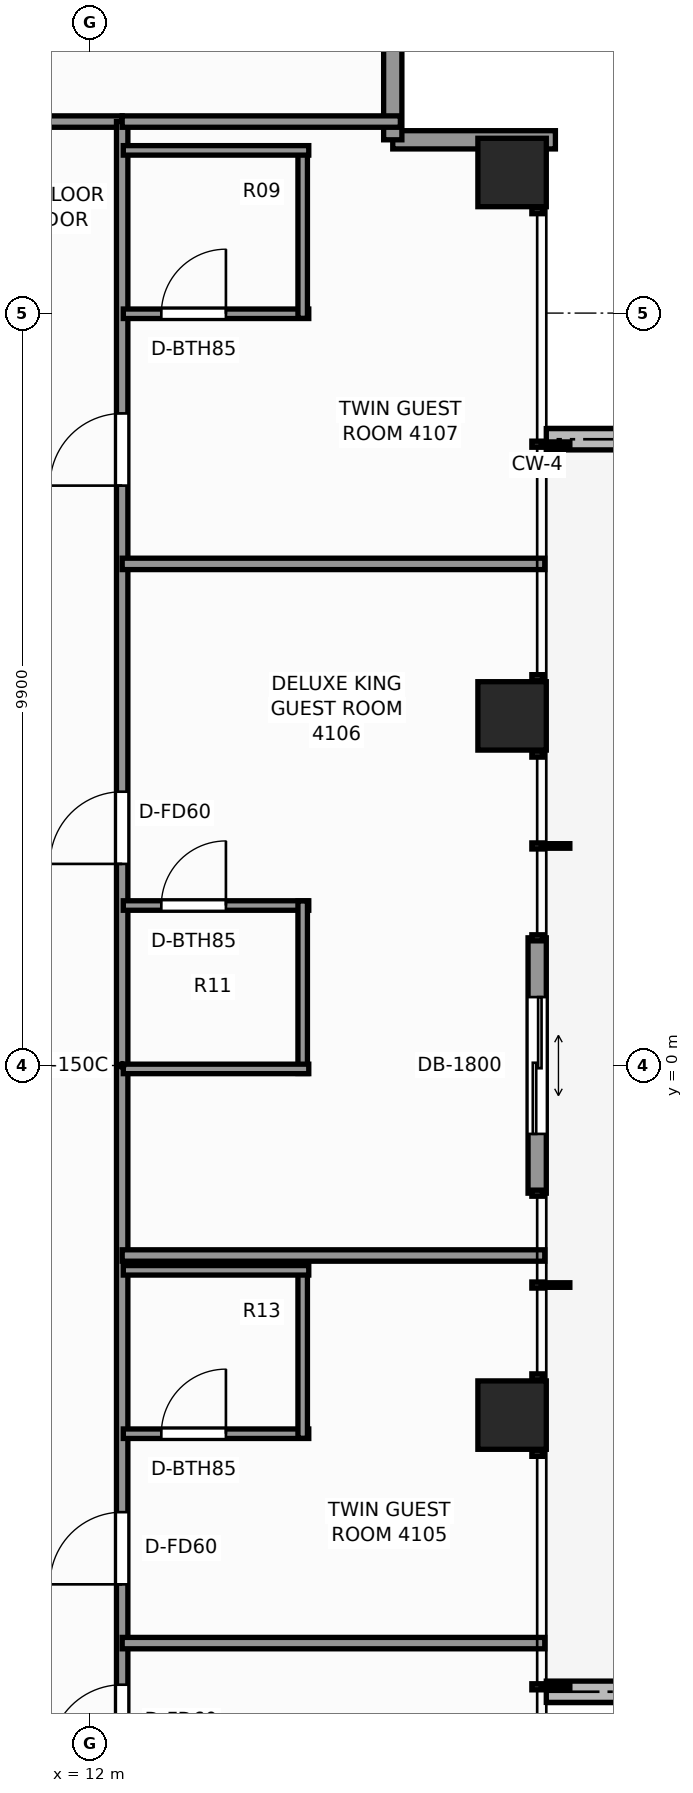
"""IFC4 building model, lengths in metres.
Left out: names, types, materials, properties, quantities, classifications, styles, units other than length and angle.
Written with IfcOpenShell. Run it as: python <this file> out.ifc"""

import sys

from ifc_helpers import new_model, si_unit, direction, frame, frame_2d, origin, origin_2d, place, context, subcontext, project, spatial, rectangle, extrude, element, fill, save


model = new_model("IFC4")
c1 = context("Model", 3, precision=1e-05, world=origin(), true_north=direction((0.0, 1.0)))
c2 = subcontext(c1, "Body", "Model", "MODEL_VIEW")
j1 = project(units=[si_unit("LENGTHUNIT", "METRE"), si_unit("PLANEANGLEUNIT", "RADIAN")], contexts=[c1])
p1 = place(None, origin())
s1 = spatial("IfcSite", under=j1, at=p1, CompositionType="ELEMENT")
p2 = place(p1, origin())
s2 = spatial("IfcBuilding", under=s1, at=p2, CompositionType="ELEMENT")
p3 = place(p2, frame((0.0, 0.0, 141.5)))
s3 = spatial("IfcBuildingStorey", under=s2, at=p3, CompositionType="ELEMENT", Elevation=141.5)
for number, where, z_axis, x_axis in (
    (1, (17.55, -4.6, 0.0), (0.0, 0.0, 1.0), (1.0, 0.0, 0.0)),
    (2, (17.55, 4.6, 0.0), (0.0, 0.0, 1.0), (1.0, 0.0, 0.0)),
    (3, (17.55, 11.75, 0.0), (0.0, 0.0, 1.0), (1.0, 0.0, 0.0)),
):
    element("IfcColumn", number, at=place(p3, frame(where, z_axis=z_axis, x_axis=x_axis)), inside=s3, PredefinedType="COLUMN", context=c2, shape_type="SweptSolid", body=[
        extrude(rectangle(XDim=0.9, YDim=0.9, at=origin_2d()), origin(), (0.0, 0.0, 1.0), 3.3),
    ])
p4 = place(p3, frame((20.34, 8.24, -0.02), z_axis=(0.0, 0.0, 1.0), x_axis=(-1.0, 0.0, 0.0)))
e4 = element("IfcWall", 4, at=p4, inside=s3, PredefinedType="PARAPET", context=c2, shape_type="SweptSolid", body=[
    extrude(rectangle(XDim=2.34, YDim=0.28, at=frame_2d((1.17, 0.0))), origin(), (0.0, 0.0, 1.0), 0.42),
])
p5 = place(p3, frame((18.0, -8.24, -0.02), z_axis=(0.0, 0.0, 1.0), x_axis=(1.0, 0.0, 0.0)))
e5 = element("IfcWall", 5, at=p5, inside=s3, PredefinedType="PARAPET", context=c2, shape_type="SweptSolid", body=[
    extrude(rectangle(XDim=1.313, YDim=0.28, at=frame_2d((0.656, 0.0))), origin(), (0.0, 0.0, 1.0), 0.42),
])
p6 = place(p3, frame((17.88, 1.68, 0.0), z_axis=(0.0, 0.0, 1.0), x_axis=(0.0, -1.0, 0.0)))
e6 = element("IfcWall", 6, at=p6, inside=s3, PredefinedType="STANDARD", context=c2, shape_type="SweptSolid", body=[
    extrude(rectangle(XDim=3.36, YDim=0.24, at=frame_2d((1.68, 0.0))), origin(), (0.0, 0.0, 1.0), 3.1),
])
p7 = place(p6, frame((0.78, 0.0, 0.0)))
e7 = element("IfcOpeningElement", 7, at=p7, cuts=e6, PredefinedType="OPENING", context=c2, shape_type="SweptSolid", body=[
    extrude(rectangle(XDim=1.8, YDim=2.2, at=frame_2d((0.9, 1.1))), frame((0.0, 0.13, 0.0), z_axis=(0.0, -1.0, 0.0), x_axis=(1.0, 0.0, 0.0)), (0.0, 0.0, 1.0), 0.26),
])
for number, where, z_axis, x_axis in (
    (8, (15.98, 12.18, 0.0), (0.0, 0.0, 1.0), (1.0, 0.0, 0.0)),
    (9, (15.98, 14.32, 0.0), (0.0, 0.0, 1.0), (0.0, -1.0, 0.0)),
):
    element("IfcWall", number, at=place(p3, frame(where, z_axis=z_axis, x_axis=x_axis)), inside=s3, PredefinedType="STANDARD", context=c2, shape_type="SweptSolid", body=[
        extrude(rectangle(XDim=2.14, YDim=0.24, at=frame_2d((1.07, 0.0))), origin(), (0.0, 0.0, 1.0), 2.479),
    ])
p8 = place(p3, frame((-12.26, 12.42, 0.0), z_axis=(0.0, 0.0, 1.0), x_axis=(1.0, 0.0, 0.0)))
e10 = element("IfcWall", 10, at=p8, inside=s3, PredefinedType="PARTITIONING", context=c2, shape_type="SweptSolid", body=[
    extrude(rectangle(XDim=24.68, YDim=0.15, at=frame_2d((12.34, 0.0))), origin(), (0.0, 0.0, 1.0), 2.312),
])
p9 = place(p8, frame((2.93, 0.0, 0.0)))
e11 = element("IfcOpeningElement", 11, at=p9, cuts=e10, PredefinedType="OPENING", context=c2, shape_type="SweptSolid", body=[
    extrude(rectangle(XDim=0.9, YDim=2.06, at=frame_2d((0.45, 1.03))), frame((0.0, 0.085, 0.0), z_axis=(0.0, -1.0, 0.0), x_axis=(1.0, 0.0, 0.0)), (0.0, 0.0, 1.0), 0.17),
])
p10 = place(p8, frame((5.09, 0.0, 0.0)))
e12 = element("IfcOpeningElement", 12, at=p10, cuts=e10, PredefinedType="OPENING", context=c2, shape_type="SweptSolid", body=[
    extrude(rectangle(XDim=0.9, YDim=2.06, at=frame_2d((0.45, 1.03))), frame((0.0, 0.085, 0.0), z_axis=(0.0, -1.0, 0.0), x_axis=(1.0, 0.0, 0.0)), (0.0, 0.0, 1.0), 0.17),
])
p11 = place(p8, frame((9.092, 0.0, 0.0)))
e13 = element("IfcOpeningElement", 13, at=p11, cuts=e10, PredefinedType="OPENING", context=c2, shape_type="SweptSolid", body=[
    extrude(rectangle(XDim=0.95, YDim=2.06, at=frame_2d((0.475, 1.03))), frame((0.0, 0.085, 0.0), z_axis=(0.0, -1.0, 0.0), x_axis=(1.0, 0.0, 0.0)), (0.0, 0.0, 1.0), 0.17),
])
p12 = place(p8, frame((13.84, 0.0, 0.0)))
e14 = element("IfcOpeningElement", 14, at=p12, cuts=e10, PredefinedType="OPENING", context=c2, shape_type="SweptSolid", body=[
    extrude(rectangle(XDim=0.9, YDim=2.06, at=frame_2d((0.45, 1.03))), frame((0.0, 0.085, 0.0), z_axis=(0.0, -1.0, 0.0), x_axis=(1.0, 0.0, 0.0)), (0.0, 0.0, 1.0), 0.17),
])
p13 = place(p8, frame((20.256, 0.0, 0.0)))
e15 = element("IfcOpeningElement", 15, at=p13, cuts=e10, PredefinedType="OPENING", context=c2, shape_type="SweptSolid", body=[
    extrude(rectangle(XDim=0.9, YDim=2.06, at=frame_2d((0.45, 1.03))), frame((0.0, 0.085, 0.0), z_axis=(0.0, -1.0, 0.0), x_axis=(1.0, 0.0, 0.0)), (0.0, 0.0, 1.0), 0.17),
])
p14 = place(p3, frame((12.42, -12.42, 0.0), z_axis=(0.0, 0.0, 1.0), x_axis=(0.0, 1.0, 0.0)))
e16 = element("IfcWall", 16, at=p14, inside=s3, PredefinedType="PARTITIONING", context=c2, shape_type="SweptSolid", body=[
    extrude(rectangle(XDim=24.84, YDim=0.15, at=frame_2d((12.42, 0.0))), origin(), (0.0, 0.0, 1.0), 2.312),
])
p15 = place(p14, frame((3.323, 0.0, 0.0)))
e17 = element("IfcOpeningElement", 17, at=p15, cuts=e16, PredefinedType="OPENING", context=c2, shape_type="SweptSolid", body=[
    extrude(rectangle(XDim=0.95, YDim=2.06, at=frame_2d((0.475, 1.03))), frame((0.0, 0.085, 0.0), z_axis=(0.0, -1.0, 0.0), x_axis=(1.0, 0.0, 0.0)), (0.0, 0.0, 1.0), 0.17),
])
p16 = place(p14, frame((5.593, 0.0, 0.0)))
e18 = element("IfcOpeningElement", 18, at=p16, cuts=e16, PredefinedType="OPENING", context=c2, shape_type="SweptSolid", body=[
    extrude(rectangle(XDim=0.95, YDim=2.06, at=frame_2d((0.475, 1.03))), frame((0.0, 0.085, 0.0), z_axis=(0.0, -1.0, 0.0), x_axis=(1.0, 0.0, 0.0)), (0.0, 0.0, 1.0), 0.17),
])
p17 = place(p14, frame((15.073, 0.0, 0.0)))
e19 = element("IfcOpeningElement", 19, at=p17, cuts=e16, PredefinedType="OPENING", context=c2, shape_type="SweptSolid", body=[
    extrude(rectangle(XDim=0.95, YDim=2.06, at=frame_2d((0.475, 1.03))), frame((0.0, 0.085, 0.0), z_axis=(0.0, -1.0, 0.0), x_axis=(1.0, 0.0, 0.0)), (0.0, 0.0, 1.0), 0.17),
])
p18 = place(p14, frame((20.05, 0.0, 0.0)))
e20 = element("IfcOpeningElement", 20, at=p18, cuts=e16, PredefinedType="OPENING", context=c2, shape_type="SweptSolid", body=[
    extrude(rectangle(XDim=0.95, YDim=2.06, at=frame_2d((0.475, 1.03))), frame((0.0, 0.085, 0.0), z_axis=(0.0, -1.0, 0.0), x_axis=(1.0, 0.0, 0.0)), (0.0, 0.0, 1.0), 0.17),
])
p19 = place(p3, frame((12.42, 12.42, 0.0), z_axis=(0.0, 0.0, 1.0), x_axis=(1.0, 0.0, 0.0)))
e21 = element("IfcWall", 21, at=p19, inside=s3, PredefinedType="PARTITIONING", context=c2, shape_type="SweptSolid", body=[
    extrude(rectangle(XDim=3.66, YDim=0.15, at=frame_2d((1.83, 0.0))), origin(), (0.0, 0.0, 1.0), 3.1),
])
for number, where, z_axis, x_axis in (
    (22, (12.42, -7.6, 0.0), (0.0, 0.0, 1.0), (1.0, 0.0, 0.0)),
    (23, (12.42, -2.5, 0.0), (0.0, 0.0, 1.0), (1.0, 0.0, 0.0)),
):
    element("IfcWall", number, at=place(p3, frame(where, z_axis=z_axis, x_axis=x_axis)), inside=s3, PredefinedType="PARTITIONING", context=c2, shape_type="SweptSolid", body=[
        extrude(rectangle(XDim=5.56, YDim=0.15, at=frame_2d((2.78, 0.0))), origin(), (0.0, 0.0, 1.0), 2.469),
    ])
p20 = place(p3, frame((12.435, -4.845, 0.0), z_axis=(0.0, 0.0, 1.0), x_axis=(1.0, 0.0, 0.0)))
e24 = element("IfcWall", 24, at=p20, inside=s3, PredefinedType="PARTITIONING", context=c2, shape_type="SweptSolid", body=[
    extrude(rectangle(XDim=2.44, YDim=0.125, at=frame_2d((1.22, 0.0))), origin(), (0.0, 0.0, 1.0), 2.312),
])
p21 = place(p20, frame((0.5, 0.0, 0.0)))
e25 = element("IfcOpeningElement", 25, at=p21, cuts=e24, PredefinedType="OPENING", context=c2, shape_type="SweptSolid", body=[
    extrude(rectangle(XDim=0.85, YDim=2.03, at=frame_2d((0.425, 1.015))), frame((0.0, 0.073, 0.0), z_axis=(0.0, -1.0, 0.0), x_axis=(1.0, 0.0, 0.0)), (0.0, 0.0, 1.0), 0.145),
])
p22 = place(p3, frame((14.795, -4.905, 0.0), z_axis=(0.0, 0.0, 1.0), x_axis=(0.0, 1.0, 0.0)))
e26 = element("IfcWall", 26, at=p22, inside=s3, PredefinedType="PARTITIONING", context=c2, shape_type="SweptSolid", body=[
    extrude(rectangle(XDim=2.27, YDim=0.125, at=frame_2d((1.135, 0.0))), origin(), (0.0, 0.0, 1.0), 2.312),
])
p23 = place(p3, frame((12.435, -2.695, 0.0), z_axis=(0.0, 0.0, 1.0), x_axis=(1.0, 0.0, 0.0)))
e27 = element("IfcWall", 27, at=p23, inside=s3, PredefinedType="PARTITIONING", context=c2, shape_type="SweptSolid", body=[
    extrude(rectangle(XDim=2.44, YDim=0.125, at=frame_2d((1.22, 0.0))), origin(), (0.0, 0.0, 1.0), 3.1),
])
p24 = place(p3, frame((12.42, 6.6, 0.0), z_axis=(0.0, 0.0, 1.0), x_axis=(1.0, 0.0, 0.0)))
e28 = element("IfcWall", 28, at=p24, inside=s3, PredefinedType="PARTITIONING", context=c2, shape_type="SweptSolid", body=[
    extrude(rectangle(XDim=5.56, YDim=0.15, at=frame_2d((2.78, 0.0))), origin(), (0.0, 0.0, 1.0), 2.469),
])
p25 = place(p3, frame((12.435, 2.105, 0.0), z_axis=(0.0, 0.0, 1.0), x_axis=(1.0, 0.0, 0.0)))
e29 = element("IfcWall", 29, at=p25, inside=s3, PredefinedType="PARTITIONING", context=c2, shape_type="SweptSolid", body=[
    extrude(rectangle(XDim=2.44, YDim=0.125, at=frame_2d((1.22, 0.0))), origin(), (0.0, 0.0, 1.0), 3.1),
])
p26 = place(p25, frame((0.5, 0.0, 0.0)))
e30 = element("IfcOpeningElement", 30, at=p26, cuts=e29, PredefinedType="OPENING", context=c2, shape_type="SweptSolid", body=[
    extrude(rectangle(XDim=0.85, YDim=2.03, at=frame_2d((0.425, 1.015))), frame((0.0, 0.073, 0.0), z_axis=(0.0, -1.0, 0.0), x_axis=(1.0, 0.0, 0.0)), (0.0, 0.0, 1.0), 0.145),
])
p27 = place(p3, frame((14.795, -0.105, 0.0), z_axis=(0.0, 0.0, 1.0), x_axis=(0.0, 1.0, 0.0)))
e31 = element("IfcWall", 31, at=p27, inside=s3, PredefinedType="PARTITIONING", context=c2, shape_type="SweptSolid", body=[
    extrude(rectangle(XDim=2.27, YDim=0.125, at=frame_2d((1.135, 0.0))), origin(), (0.0, 0.0, 1.0), 2.625),
])
p28 = place(p3, frame((12.435, -0.045, 0.0), z_axis=(0.0, 0.0, 1.0), x_axis=(1.0, 0.0, 0.0)))
e32 = element("IfcWall", 32, at=p28, inside=s3, PredefinedType="PARTITIONING", context=c2, shape_type="SweptSolid", body=[
    extrude(rectangle(XDim=2.44, YDim=0.125, at=frame_2d((1.22, 0.0))), origin(), (0.0, 0.0, 1.0), 2.625),
])
p29 = place(p3, frame((12.435, 9.891, 0.0), z_axis=(0.0, 0.0, 1.0), x_axis=(1.0, 0.0, 0.0)))
e33 = element("IfcWall", 33, at=p29, inside=s3, PredefinedType="PARTITIONING", context=c2, shape_type="SweptSolid", body=[
    extrude(rectangle(XDim=2.44, YDim=0.125, at=frame_2d((1.22, 0.0))), origin(), (0.0, 0.0, 1.0), 3.1),
])
p30 = place(p29, frame((0.5, 0.0, 0.0)))
e34 = element("IfcOpeningElement", 34, at=p30, cuts=e33, PredefinedType="OPENING", context=c2, shape_type="SweptSolid", body=[
    extrude(rectangle(XDim=0.85, YDim=2.03, at=frame_2d((0.425, 1.015))), frame((0.0, 0.073, 0.0), z_axis=(0.0, -1.0, 0.0), x_axis=(1.0, 0.0, 0.0)), (0.0, 0.0, 1.0), 0.145),
])
p31 = place(p3, frame((14.795, 9.831, 0.0), z_axis=(0.0, 0.0, 1.0), x_axis=(0.0, 1.0, 0.0)))
e35 = element("IfcWall", 35, at=p31, inside=s3, PredefinedType="PARTITIONING", context=c2, shape_type="SweptSolid", body=[
    extrude(rectangle(XDim=2.27, YDim=0.125, at=frame_2d((1.135, 0.0))), origin(), (0.0, 0.0, 1.0), 2.312),
])
p32 = place(p3, frame((12.435, 12.041, 0.0), z_axis=(0.0, 0.0, 1.0), x_axis=(1.0, 0.0, 0.0)))
e36 = element("IfcWall", 36, at=p32, inside=s3, PredefinedType="PARTITIONING", context=c2, shape_type="SweptSolid", body=[
    extrude(rectangle(XDim=2.44, YDim=0.125, at=frame_2d((1.22, 0.0))), origin(), (0.0, 0.0, 1.0), 3.1),
])
p33 = place(p7, origin())
e37 = element("IfcDoor", 37, at=p33, inside=s3, OperationType="DOUBLE_DOOR_SLIDING", PredefinedType="DOOR", context=c2, shape_type="SweptSolid", body=[
    extrude(rectangle(XDim=1.8, YDim=2.2, at=frame_2d((0.9, 1.1))), frame((0.0, 0.025, 0.0), z_axis=(0.0, -1.0, 0.0), x_axis=(1.0, 0.0, 0.0)), (0.0, 0.0, 1.0), 0.05),
])
fill(e7, e37)
p34 = place(p15, origin())
e38 = element("IfcDoor", 38, at=p34, inside=s3, OperationType="SINGLE_SWING_LEFT", PredefinedType="DOOR", context=c2, shape_type="SweptSolid", body=[
    extrude(rectangle(XDim=0.95, YDim=2.06, at=frame_2d((0.475, 1.03))), frame((0.0, 0.025, 0.0), z_axis=(0.0, -1.0, 0.0), x_axis=(1.0, 0.0, 0.0)), (0.0, 0.0, 1.0), 0.05),
])
fill(e17, e38)
p35 = place(p21, origin())
e39 = element("IfcDoor", 39, at=p35, inside=s3, OperationType="SINGLE_SWING_RIGHT", PredefinedType="DOOR", context=c2, shape_type="SweptSolid", body=[
    extrude(rectangle(XDim=0.85, YDim=2.03, at=frame_2d((0.425, 1.015))), frame((0.0, 0.025, 0.0), z_axis=(0.0, -1.0, 0.0), x_axis=(1.0, 0.0, 0.0)), (0.0, 0.0, 1.0), 0.05),
])
fill(e25, e39)
p36 = place(p16, origin())
e40 = element("IfcDoor", 40, at=p36, inside=s3, OperationType="SINGLE_SWING_LEFT", PredefinedType="DOOR", context=c2, shape_type="SweptSolid", body=[
    extrude(rectangle(XDim=0.95, YDim=2.06, at=frame_2d((0.475, 1.03))), frame((0.0, 0.025, 0.0), z_axis=(0.0, -1.0, 0.0), x_axis=(1.0, 0.0, 0.0)), (0.0, 0.0, 1.0), 0.05),
])
fill(e18, e40)
p37 = place(p26, origin())
e41 = element("IfcDoor", 41, at=p37, inside=s3, OperationType="SINGLE_SWING_RIGHT", PredefinedType="DOOR", context=c2, shape_type="SweptSolid", body=[
    extrude(rectangle(XDim=0.85, YDim=2.03, at=frame_2d((0.425, 1.015))), frame((0.0, 0.025, 0.0), z_axis=(0.0, -1.0, 0.0), x_axis=(1.0, 0.0, 0.0)), (0.0, 0.0, 1.0), 0.05),
])
fill(e30, e41)
p38 = place(p17, origin())
e42 = element("IfcDoor", 42, at=p38, inside=s3, OperationType="SINGLE_SWING_LEFT", PredefinedType="DOOR", context=c2, shape_type="SweptSolid", body=[
    extrude(rectangle(XDim=0.95, YDim=2.06, at=frame_2d((0.475, 1.03))), frame((0.0, 0.025, 0.0), z_axis=(0.0, -1.0, 0.0), x_axis=(1.0, 0.0, 0.0)), (0.0, 0.0, 1.0), 0.05),
])
fill(e19, e42)
p39 = place(p30, origin())
e43 = element("IfcDoor", 43, at=p39, inside=s3, OperationType="SINGLE_SWING_RIGHT", PredefinedType="DOOR", context=c2, shape_type="SweptSolid", body=[
    extrude(rectangle(XDim=0.85, YDim=2.03, at=frame_2d((0.425, 1.015))), frame((0.0, 0.025, 0.0), z_axis=(0.0, -1.0, 0.0), x_axis=(1.0, 0.0, 0.0)), (0.0, 0.0, 1.0), 0.05),
])
fill(e34, e43)
p40 = place(p18, origin())
e44 = element("IfcDoor", 44, at=p40, inside=s3, OperationType="SINGLE_SWING_LEFT", PredefinedType="DOOR", context=c2, shape_type="SweptSolid", body=[
    extrude(rectangle(XDim=0.95, YDim=2.06, at=frame_2d((0.475, 1.03))), frame((0.0, 0.025, 0.0), z_axis=(0.0, -1.0, 0.0), x_axis=(1.0, 0.0, 0.0)), (0.0, 0.0, 1.0), 0.05),
])
fill(e20, e44)
save(model, sys.argv[1])
